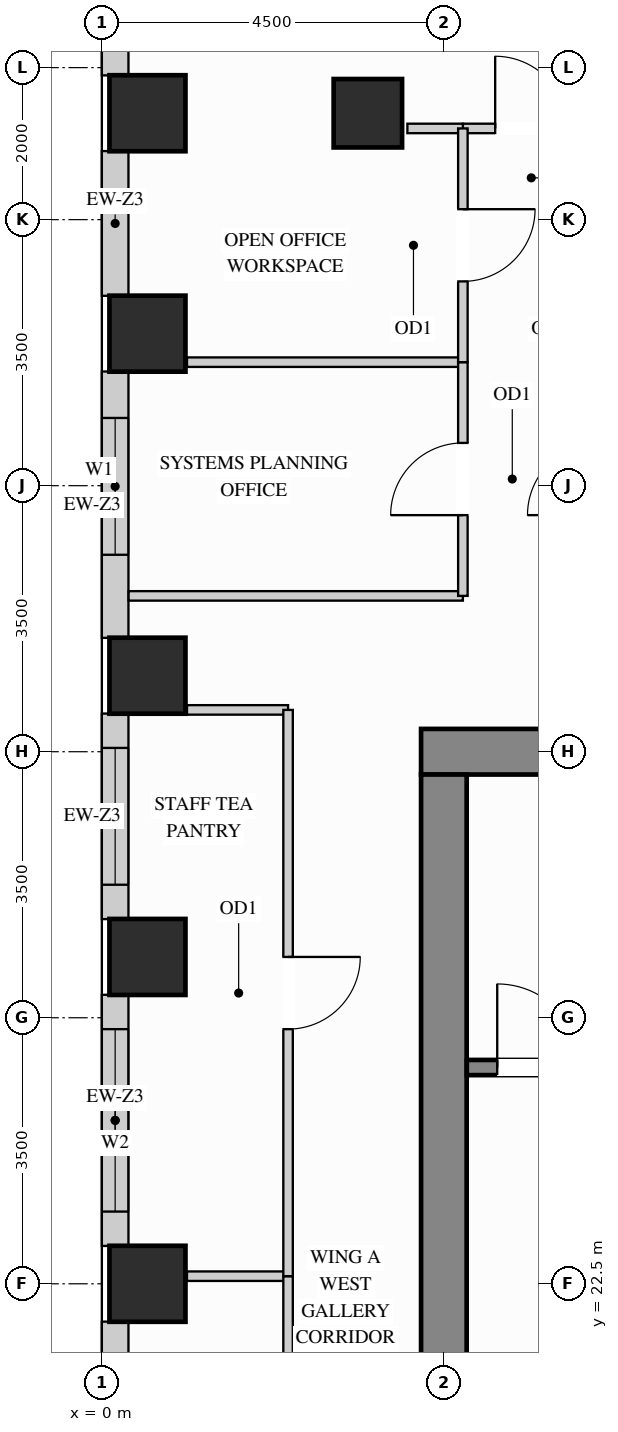
"""IFC4 building model, lengths in metres.
Left out: names, types, materials, properties, quantities, classifications, styles, units other than length and angle.
Written with IfcOpenShell. Run it as: python <this file> out.ifc"""

import sys

from ifc_helpers import new_model, si_unit, direction, frame, frame_2d, origin, origin_2d, place, context, subcontext, project, spatial, rectangle, extrude, source, transform, mapped, element, fill, save


model = new_model("IFC4")
c1 = context("Model", 3, precision=1e-05, world=origin(), true_north=direction((0.0, 1.0)))
c2 = subcontext(c1, "Body", "Model", "MODEL_VIEW")
j1 = project(units=[si_unit("LENGTHUNIT", "METRE"), si_unit("PLANEANGLEUNIT", "RADIAN")], contexts=[c1])
p1 = place(None, origin())
s1 = spatial("IfcSite", under=j1, at=p1, CompositionType="ELEMENT")
p2 = place(p1, origin())
s2 = spatial("IfcBuilding", under=s1, at=p2, CompositionType="ELEMENT")
p3 = place(p2, frame((0.0, 0.0, 204.3)))
s3 = spatial("IfcBuildingStorey", under=s2, at=p3, CompositionType="ELEMENT", Elevation=204.3)
m1 = source(origin(), c2, "Body", "SweptSolid", [
    extrude(rectangle(XDim=0.9, YDim=0.9, at=origin_2d()), origin(), (0.0, 0.0, 1.0), 3.32),
])
p4 = place(p3, frame((3.5, 37.9, 0.0), z_axis=(0.0, 0.0, 1.0), x_axis=(1.0, 0.0, 0.0)))
e1 = element("IfcColumn", 1, at=p4, inside=s3, PredefinedType="COLUMN", context=c2, shape_type="MappedRepresentation", body=[
    mapped(m1, transform((0.0, 0.0, 0.0), x_axis=(1.0, 0.0, 0.0), y_axis=(0.0, 1.0, 0.0), z_axis=(0.0, 0.0, 1.0))),
])
m2 = source(origin(), c2, "Body", "SweptSolid", [
    extrude(rectangle(XDim=1.0, YDim=1.0, at=origin_2d()), origin(), (0.0, 0.0, 1.0), 3.32),
])
for number, where, z_axis, x_axis in (
    (2, (0.6, 22.5, 0.0), (0.0, 0.0, 1.0), (1.0, 0.0, 0.0)),
    (3, (0.6, 26.8, 0.0), (0.0, 0.0, 1.0), (1.0, 0.0, 0.0)),
    (4, (0.6, 30.5, 0.0), (0.0, 0.0, 1.0), (1.0, 0.0, 0.0)),
    (5, (0.6, 35.0, 0.0), (0.0, 0.0, 1.0), (1.0, 0.0, 0.0)),
    (6, (0.6, 37.9, 0.0), (0.0, 0.0, 1.0), (1.0, 0.0, 0.0)),
):
    element("IfcColumn", number, at=place(p3, frame(where, z_axis=z_axis, x_axis=x_axis)), inside=s3, PredefinedType="COLUMN", context=c2, shape_type="MappedRepresentation", body=[
        mapped(m2, transform((0.0, 0.0, 0.0), x_axis=(1.0, 0.0, 0.0), y_axis=(0.0, 1.0, 0.0), z_axis=(0.0, 0.0, 1.0))),
    ])
m3 = source(origin(), c2, "Body", "SweptSolid", [
    extrude(rectangle(XDim=10.6, YDim=0.6, at=frame_2d((5.3, 0.0))), origin(), (0.0, 0.0, 1.0), 3.32),
])
p5 = place(p3, frame((4.2, 29.5, 0.0), z_axis=(0.0, 0.0, 1.0), x_axis=(1.0, 0.0, 0.0)))
e7 = element("IfcWall", 7, at=p5, inside=s3, PredefinedType="SHEAR", context=c2, shape_type="MappedRepresentation", body=[
    mapped(m3, transform((0.0, 0.0, 0.0), x_axis=(1.0, 0.0, 0.0), y_axis=(0.0, 1.0, 0.0), z_axis=(0.0, 0.0, 1.0))),
])
m4 = source(origin(), c2, "Body", "SweptSolid", [
    extrude(rectangle(XDim=20.4, YDim=0.6, at=frame_2d((10.2, 0.0))), origin(), (0.0, 0.0, 1.0), 3.32),
])
p6 = place(p3, frame((4.5, 8.8, 0.0), z_axis=(0.0, 0.0, 1.0), x_axis=(0.0, 1.0, 0.0)))
e8 = element("IfcWall", 8, at=p6, inside=s3, PredefinedType="SHEAR", context=c2, shape_type="MappedRepresentation", body=[
    mapped(m4, transform((0.0, 0.0, 0.0), x_axis=(1.0, 0.0, 0.0), y_axis=(0.0, 1.0, 0.0), z_axis=(0.0, 0.0, 1.0))),
])
m5 = source(origin(), c2, "Body", "SweptSolid", [
    extrude(rectangle(XDim=0.754, YDim=0.35, at=frame_2d((0.377, 0.0))), origin(), (0.0, 0.0, 1.0), 3.305),
])
p7 = place(p3, frame((0.175, 39.152, 0.0), z_axis=(0.0, 0.0, 1.0), x_axis=(0.0, -1.0, 0.0)))
e9 = element("IfcWall", 9, at=p7, inside=s3, PredefinedType="SOLIDWALL", context=c2, shape_type="MappedRepresentation", body=[
    mapped(m5, transform((0.0, 0.0, 0.0), x_axis=(1.0, 0.0, 0.0), y_axis=(0.0, 1.0, 0.0), z_axis=(0.0, 0.0, 1.0))),
])
m6 = source(origin(), c2, "Body", "SweptSolid", [
    extrude(rectangle(XDim=1.904, YDim=0.35, at=frame_2d((0.952, 0.0))), origin(), (0.0, 0.0, 1.0), 2.532),
])
p8 = place(p3, frame((0.175, 37.402, 0.0), z_axis=(0.0, 0.0, 1.0), x_axis=(0.0, -1.0, 0.0)))
e10 = element("IfcWall", 10, at=p8, inside=s3, PredefinedType="SOLIDWALL", context=c2, shape_type="MappedRepresentation", body=[
    mapped(m6, transform((0.0, 0.0, 0.0), x_axis=(1.0, 0.0, 0.0), y_axis=(0.0, 1.0, 0.0), z_axis=(0.0, 0.0, 1.0))),
])
p9 = place(p3, frame((0.175, 34.502, 0.0), z_axis=(0.0, 0.0, 1.0), x_axis=(0.0, -1.0, 0.0)))
e11 = element("IfcWall", 11, at=p9, inside=s3, PredefinedType="SOLIDWALL", context=c2, shape_type="SweptSolid", body=[
    extrude(rectangle(XDim=3.504, YDim=0.35, at=frame_2d((1.752, 0.0))), origin(), (0.0, 0.0, 1.0), 2.532),
])
p10 = place(p9, frame((0.611, 0.0, 0.78)))
e12 = element("IfcOpeningElement", 12, at=p10, cuts=e11, PredefinedType="OPENING", context=c2, shape_type="SweptSolid", body=[
    extrude(rectangle(XDim=1.8, YDim=1.572, at=frame_2d((0.9, 0.786))), frame((0.0, 0.185, 0.0), z_axis=(0.0, -1.0, 0.0), x_axis=(1.0, 0.0, 0.0)), (0.0, 0.0, 1.0), 0.37),
])
p11 = place(p3, frame((0.175, 30.002, 0.0), z_axis=(0.0, 0.0, 1.0), x_axis=(0.0, -1.0, 0.0)))
e13 = element("IfcWall", 13, at=p11, inside=s3, PredefinedType="SOLIDWALL", context=c2, shape_type="SweptSolid", body=[
    extrude(rectangle(XDim=2.704, YDim=0.35, at=frame_2d((1.352, 0.0))), origin(), (0.0, 0.0, 1.0), 2.532),
])
p12 = place(p11, frame((0.452, 0.0, 0.78)))
e14 = element("IfcOpeningElement", 14, at=p12, cuts=e13, PredefinedType="OPENING", context=c2, shape_type="SweptSolid", body=[
    extrude(rectangle(XDim=1.8, YDim=1.572, at=frame_2d((0.9, 0.786))), frame((0.0, 0.185, 0.0), z_axis=(0.0, -1.0, 0.0), x_axis=(1.0, 0.0, 0.0)), (0.0, 0.0, 1.0), 0.37),
])
p13 = place(p3, frame((0.175, 26.302, 0.0), z_axis=(0.0, 0.0, 1.0), x_axis=(0.0, -1.0, 0.0)))
e15 = element("IfcWall", 15, at=p13, inside=s3, PredefinedType="SOLIDWALL", context=c2, shape_type="SweptSolid", body=[
    extrude(rectangle(XDim=3.304, YDim=0.35, at=frame_2d((1.652, 0.0))), origin(), (0.0, 0.0, 1.0), 2.532),
])
p14 = place(p13, frame((0.452, 0.0, 0.78)))
e16 = element("IfcOpeningElement", 16, at=p14, cuts=e15, PredefinedType="OPENING", context=c2, shape_type="SweptSolid", body=[
    extrude(rectangle(XDim=2.4, YDim=1.572, at=frame_2d((1.2, 0.786))), frame((0.0, 0.185, 0.0), z_axis=(0.0, -1.0, 0.0), x_axis=(1.0, 0.0, 0.0)), (0.0, 0.0, 1.0), 0.37),
])
p15 = place(p3, frame((0.175, 22.002, 0.0), z_axis=(0.0, 0.0, 1.0), x_axis=(0.0, -1.0, 0.0)))
e17 = element("IfcWall", 17, at=p15, inside=s3, PredefinedType="SOLIDWALL", context=c2, shape_type="SweptSolid", body=[
    extrude(rectangle(XDim=3.504, YDim=0.35, at=frame_2d((1.752, 0.0))), origin(), (0.0, 0.0, 1.0), 2.532),
])
p16 = place(p15, frame((0.552, 0.0, 0.78)))
e18 = element("IfcOpeningElement", 18, at=p16, cuts=e17, PredefinedType="OPENING", context=c2, shape_type="SweptSolid", body=[
    extrude(rectangle(XDim=2.4, YDim=1.572, at=frame_2d((1.2, 0.786))), frame((0.0, 0.185, 0.0), z_axis=(0.0, -1.0, 0.0), x_axis=(1.0, 0.0, 0.0)), (0.0, 0.0, 1.0), 0.37),
])
m7 = source(origin(), c2, "Body", "SweptSolid", [
    extrude(rectangle(XDim=4.398, YDim=0.125, at=frame_2d((2.199, 0.0))), origin(), (0.0, 0.0, 1.0), 3.305),
])
p17 = place(p3, frame((0.352, 31.55, 0.0), z_axis=(0.0, 0.0, 1.0), x_axis=(1.0, 0.0, 0.0)))
e19 = element("IfcWall", 19, at=p17, inside=s3, PredefinedType="PARTITIONING", context=c2, shape_type="MappedRepresentation", body=[
    mapped(m7, transform((0.0, 0.0, 0.0), x_axis=(1.0, 0.0, 0.0), y_axis=(0.0, 1.0, 0.0), z_axis=(0.0, 0.0, 1.0))),
])
m8 = source(origin(), c2, "Body", "SweptSolid", [
    extrude(rectangle(XDim=3.63, YDim=0.125, at=frame_2d((1.815, 0.0))), origin(), (0.0, 0.0, 1.0), 3.305),
])
p18 = place(p3, frame((1.12, 34.625, 0.0), z_axis=(0.0, 0.0, 1.0), x_axis=(1.0, 0.0, 0.0)))
e20 = element("IfcWall", 20, at=p18, inside=s3, PredefinedType="PARTITIONING", context=c2, shape_type="MappedRepresentation", body=[
    mapped(m8, transform((0.0, 0.0, 0.0), x_axis=(1.0, 0.0, 0.0), y_axis=(0.0, 1.0, 0.0), z_axis=(0.0, 0.0, 1.0))),
])
m9 = source(origin(), c2, "Body", "SweptSolid", [
    extrude(rectangle(XDim=1.33, YDim=0.125, at=frame_2d((0.665, 0.0))), origin(), (0.0, 0.0, 1.0), 3.305),
])
p19 = place(p3, frame((1.12, 30.05, 0.0), z_axis=(0.0, 0.0, 1.0), x_axis=(1.0, 0.0, 0.0)))
e21 = element("IfcWall", 21, at=p19, inside=s3, PredefinedType="PARTITIONING", context=c2, shape_type="MappedRepresentation", body=[
    mapped(m9, transform((0.0, 0.0, 0.0), x_axis=(1.0, 0.0, 0.0), y_axis=(0.0, 1.0, 0.0), z_axis=(0.0, 0.0, 1.0))),
])
p20 = place(p3, frame((4.75, 37.7, 0.0), z_axis=(0.0, 0.0, 1.0), x_axis=(1.0, 0.0, 0.0)))
e22 = element("IfcWall", 22, at=p20, inside=s3, PredefinedType="PARTITIONING", context=c2, shape_type="SweptSolid", body=[
    extrude(rectangle(XDim=1.8, YDim=0.125, at=frame_2d((0.9, 0.0))), origin(), (0.0, 0.0, 1.0), 2.693),
])
p21 = place(p20, frame((0.425, 0.0, 0.0)))
e23 = element("IfcOpeningElement", 23, at=p21, cuts=e22, PredefinedType="OPENING", context=c2, shape_type="SweptSolid", body=[
    extrude(rectangle(XDim=0.95, YDim=2.15, at=frame_2d((0.475, 1.075))), frame((0.0, 0.073, 0.0), z_axis=(0.0, -1.0, 0.0), x_axis=(1.0, 0.0, 0.0)), (0.0, 0.0, 1.0), 0.145),
])
m10 = source(origin(), c2, "Body", "SweptSolid", [
    extrude(rectangle(XDim=0.73, YDim=0.125, at=frame_2d((0.365, 0.0))), origin(), (0.0, 0.0, 1.0), 2.693),
])
p22 = place(p3, frame((4.02, 37.7, 0.0), z_axis=(0.0, 0.0, 1.0), x_axis=(1.0, 0.0, 0.0)))
e24 = element("IfcWall", 24, at=p22, inside=s3, PredefinedType="PARTITIONING", context=c2, shape_type="MappedRepresentation", body=[
    mapped(m10, transform((0.0, 0.0, 0.0), x_axis=(1.0, 0.0, 0.0), y_axis=(0.0, 1.0, 0.0), z_axis=(0.0, 0.0, 1.0))),
])
p23 = place(p3, frame((4.75, 31.55, 0.0), z_axis=(0.0, 0.0, 1.0), x_axis=(0.0, 1.0, 0.0)))
e25 = element("IfcWall", 25, at=p23, inside=s3, PredefinedType="PARTITIONING", context=c2, shape_type="SweptSolid", body=[
    extrude(rectangle(XDim=3.075, YDim=0.125, at=frame_2d((1.538, 0.0))), origin(), (0.0, 0.0, 1.0), 3.305),
])
p24 = place(p23, frame((1.062, 0.0, 0.0)))
e26 = element("IfcOpeningElement", 26, at=p24, cuts=e25, PredefinedType="OPENING", context=c2, shape_type="SweptSolid", body=[
    extrude(rectangle(XDim=0.95, YDim=2.15, at=frame_2d((0.475, 1.075))), frame((0.0, 0.073, 0.0), z_axis=(0.0, -1.0, 0.0), x_axis=(1.0, 0.0, 0.0)), (0.0, 0.0, 1.0), 0.145),
])
p25 = place(p3, frame((4.75, 34.625, 0.0), z_axis=(0.0, 0.0, 1.0), x_axis=(0.0, 1.0, 0.0)))
e27 = element("IfcWall", 27, at=p25, inside=s3, PredefinedType="PARTITIONING", context=c2, shape_type="SweptSolid", body=[
    extrude(rectangle(XDim=3.075, YDim=0.125, at=frame_2d((1.538, 0.0))), origin(), (0.0, 0.0, 1.0), 3.305),
])
p26 = place(p25, frame((1.062, 0.0, 0.0)))
e28 = element("IfcOpeningElement", 28, at=p26, cuts=e27, PredefinedType="OPENING", context=c2, shape_type="SweptSolid", body=[
    extrude(rectangle(XDim=0.95, YDim=2.15, at=frame_2d((0.475, 1.075))), frame((0.0, 0.073, 0.0), z_axis=(0.0, -1.0, 0.0), x_axis=(1.0, 0.0, 0.0)), (0.0, 0.0, 1.0), 0.145),
])
p27 = place(p3, frame((1.12, 22.6, 0.0), z_axis=(0.0, 0.0, 1.0), x_axis=(1.0, 0.0, 0.0)))
e29 = element("IfcWall", 29, at=p27, inside=s3, PredefinedType="PARTITIONING", context=c2, shape_type="MappedRepresentation", body=[
    mapped(m9, transform((0.0, 0.0, 0.0), x_axis=(1.0, 0.0, 0.0), y_axis=(0.0, 1.0, 0.0), z_axis=(0.0, 0.0, 1.0))),
])
p28 = place(p3, frame((2.45, 15.1, 0.0), z_axis=(0.0, 0.0, 1.0), x_axis=(0.0, 1.0, 0.0)))
e30 = element("IfcWall", 30, at=p28, inside=s3, PredefinedType="PARTITIONING", context=c2, shape_type="SweptSolid", body=[
    extrude(rectangle(XDim=7.5, YDim=0.125, at=frame_2d((3.75, 0.0))), origin(), (0.0, 0.0, 1.0), 3.305),
])
p29 = place(p28, frame((3.275, 0.0, 0.0)))
e31 = element("IfcOpeningElement", 31, at=p29, cuts=e30, PredefinedType="OPENING", context=c2, shape_type="SweptSolid", body=[
    extrude(rectangle(XDim=0.95, YDim=2.15, at=frame_2d((0.475, 1.075))), frame((0.0, 0.073, 0.0), z_axis=(0.0, -1.0, 0.0), x_axis=(1.0, 0.0, 0.0)), (0.0, 0.0, 1.0), 0.145),
])
p30 = place(p3, frame((2.45, 22.6, 0.0), z_axis=(0.0, 0.0, 1.0), x_axis=(0.0, 1.0, 0.0)))
e32 = element("IfcWall", 32, at=p30, inside=s3, PredefinedType="PARTITIONING", context=c2, shape_type="SweptSolid", body=[
    extrude(rectangle(XDim=7.45, YDim=0.125, at=frame_2d((3.725, 0.0))), origin(), (0.0, 0.0, 1.0), 3.305),
])
p31 = place(p30, frame((3.25, 0.0, 0.0)))
e33 = element("IfcOpeningElement", 33, at=p31, cuts=e32, PredefinedType="OPENING", context=c2, shape_type="SweptSolid", body=[
    extrude(rectangle(XDim=0.95, YDim=2.15, at=frame_2d((0.475, 1.075))), frame((0.0, 0.073, 0.0), z_axis=(0.0, -1.0, 0.0), x_axis=(1.0, 0.0, 0.0)), (0.0, 0.0, 1.0), 0.145),
])
p32 = place(p3, frame((4.802, 25.345, 0.0), z_axis=(0.0, 0.0, 1.0), x_axis=(1.0, 0.0, 0.0)))
e34 = element("IfcWall", 34, at=p32, inside=s3, PredefinedType="SHEAR", context=c2, shape_type="SweptSolid", body=[
    extrude(rectangle(XDim=7.603, YDim=0.2, at=frame_2d((3.802, 0.0))), origin(), (0.0, 0.0, 1.0), 3.32),
])
p33 = place(p32, frame((0.4, 0.0, 0.0)))
e35 = element("IfcOpeningElement", 35, at=p33, cuts=e34, PredefinedType="OPENING", context=c2, shape_type="SweptSolid", body=[
    extrude(rectangle(XDim=1.1, YDim=2.15, at=frame_2d((0.55, 1.075))), frame((0.0, 0.11, 0.0), z_axis=(0.0, -1.0, 0.0), x_axis=(1.0, 0.0, 0.0)), (0.0, 0.0, 1.0), 0.22),
])
m11 = source(origin(), c2, "Body", "SweptSolid", [
    extrude(rectangle(XDim=0.95, YDim=2.15, at=frame_2d((0.475, 1.075))), frame((0.0, 0.025, 0.0), z_axis=(0.0, -1.0, 0.0), x_axis=(1.0, 0.0, 0.0)), (0.0, 0.0, 1.0), 0.05),
])
p34 = place(p21, origin())
e36 = element("IfcDoor", 36, at=p34, inside=s3, OperationType="SINGLE_SWING_LEFT", PredefinedType="DOOR", context=c2, shape_type="MappedRepresentation", body=[
    mapped(m11, transform((0.0, 0.0, 0.0), x_axis=(1.0, 0.0, 0.0), y_axis=(0.0, 1.0, 0.0), z_axis=(0.0, 0.0, 1.0))),
])
fill(e23, e36)
p35 = place(p24, origin())
e37 = element("IfcDoor", 37, at=p35, inside=s3, OperationType="SINGLE_SWING_LEFT", PredefinedType="DOOR", context=c2, shape_type="MappedRepresentation", body=[
    mapped(m11, transform((0.0, 0.0, 0.0), x_axis=(1.0, 0.0, 0.0), y_axis=(0.0, 1.0, 0.0), z_axis=(0.0, 0.0, 1.0))),
])
fill(e26, e37)
p36 = place(p26, origin())
e38 = element("IfcDoor", 38, at=p36, inside=s3, OperationType="SINGLE_SWING_RIGHT", PredefinedType="DOOR", context=c2, shape_type="MappedRepresentation", body=[
    mapped(m11, transform((0.0, 0.0, 0.0), x_axis=(1.0, 0.0, 0.0), y_axis=(0.0, 1.0, 0.0), z_axis=(0.0, 0.0, 1.0))),
])
fill(e28, e38)
p37 = place(p31, origin())
e39 = element("IfcDoor", 39, at=p37, inside=s3, OperationType="SINGLE_SWING_RIGHT", PredefinedType="DOOR", context=c2, shape_type="MappedRepresentation", body=[
    mapped(m11, transform((0.0, 0.0, 0.0), x_axis=(1.0, 0.0, 0.0), y_axis=(0.0, 1.0, 0.0), z_axis=(0.0, 0.0, 1.0))),
])
fill(e33, e39)
m12 = source(origin(), c2, "Body", "SweptSolid", [
    extrude(rectangle(XDim=1.1, YDim=2.15, at=frame_2d((0.55, 1.075))), frame((0.0, 0.025, 0.0), z_axis=(0.0, -1.0, 0.0), x_axis=(1.0, 0.0, 0.0)), (0.0, 0.0, 1.0), 0.05),
])
p38 = place(p33, origin())
e40 = element("IfcDoor", 40, at=p38, inside=s3, OperationType="SINGLE_SWING_LEFT", PredefinedType="DOOR", context=c2, shape_type="MappedRepresentation", body=[
    mapped(m12, transform((0.0, 0.0, 0.0), x_axis=(1.0, 0.0, 0.0), y_axis=(0.0, 1.0, 0.0), z_axis=(0.0, 0.0, 1.0))),
])
fill(e35, e40)
m13 = source(origin(), c2, "Body", "SweptSolid", [
    extrude(rectangle(XDim=1.8, YDim=1.572, at=frame_2d((0.9, 0.786))), frame((0.0, 0.03, 0.0), z_axis=(0.0, -1.0, 0.0), x_axis=(1.0, 0.0, 0.0)), (0.0, 0.0, 1.0), 0.06),
])
p39 = place(p10, origin())
e41 = element("IfcWindow", 41, at=p39, inside=s3, PartitioningType="SINGLE_PANEL", PredefinedType="WINDOW", context=c2, shape_type="MappedRepresentation", body=[
    mapped(m13, transform((0.0, 0.0, 0.0), x_axis=(1.0, 0.0, 0.0), y_axis=(0.0, 1.0, 0.0), z_axis=(0.0, 0.0, 1.0))),
])
fill(e12, e41)
p40 = place(p12, origin())
e42 = element("IfcWindow", 42, at=p40, inside=s3, PartitioningType="SINGLE_PANEL", PredefinedType="WINDOW", context=c2, shape_type="MappedRepresentation", body=[
    mapped(m13, transform((0.0, 0.0, 0.0), x_axis=(1.0, 0.0, 0.0), y_axis=(0.0, 1.0, 0.0), z_axis=(0.0, 0.0, 1.0))),
])
fill(e14, e42)
m14 = source(origin(), c2, "Body", "SweptSolid", [
    extrude(rectangle(XDim=2.4, YDim=1.572, at=frame_2d((1.2, 0.786))), frame((0.0, 0.03, 0.0), z_axis=(0.0, -1.0, 0.0), x_axis=(1.0, 0.0, 0.0)), (0.0, 0.0, 1.0), 0.06),
])
p41 = place(p14, origin())
e43 = element("IfcWindow", 43, at=p41, inside=s3, PartitioningType="SINGLE_PANEL", PredefinedType="WINDOW", context=c2, shape_type="MappedRepresentation", body=[
    mapped(m14, transform((0.0, 0.0, 0.0), x_axis=(1.0, 0.0, 0.0), y_axis=(0.0, 1.0, 0.0), z_axis=(0.0, 0.0, 1.0))),
])
fill(e16, e43)
save(model, sys.argv[1])
